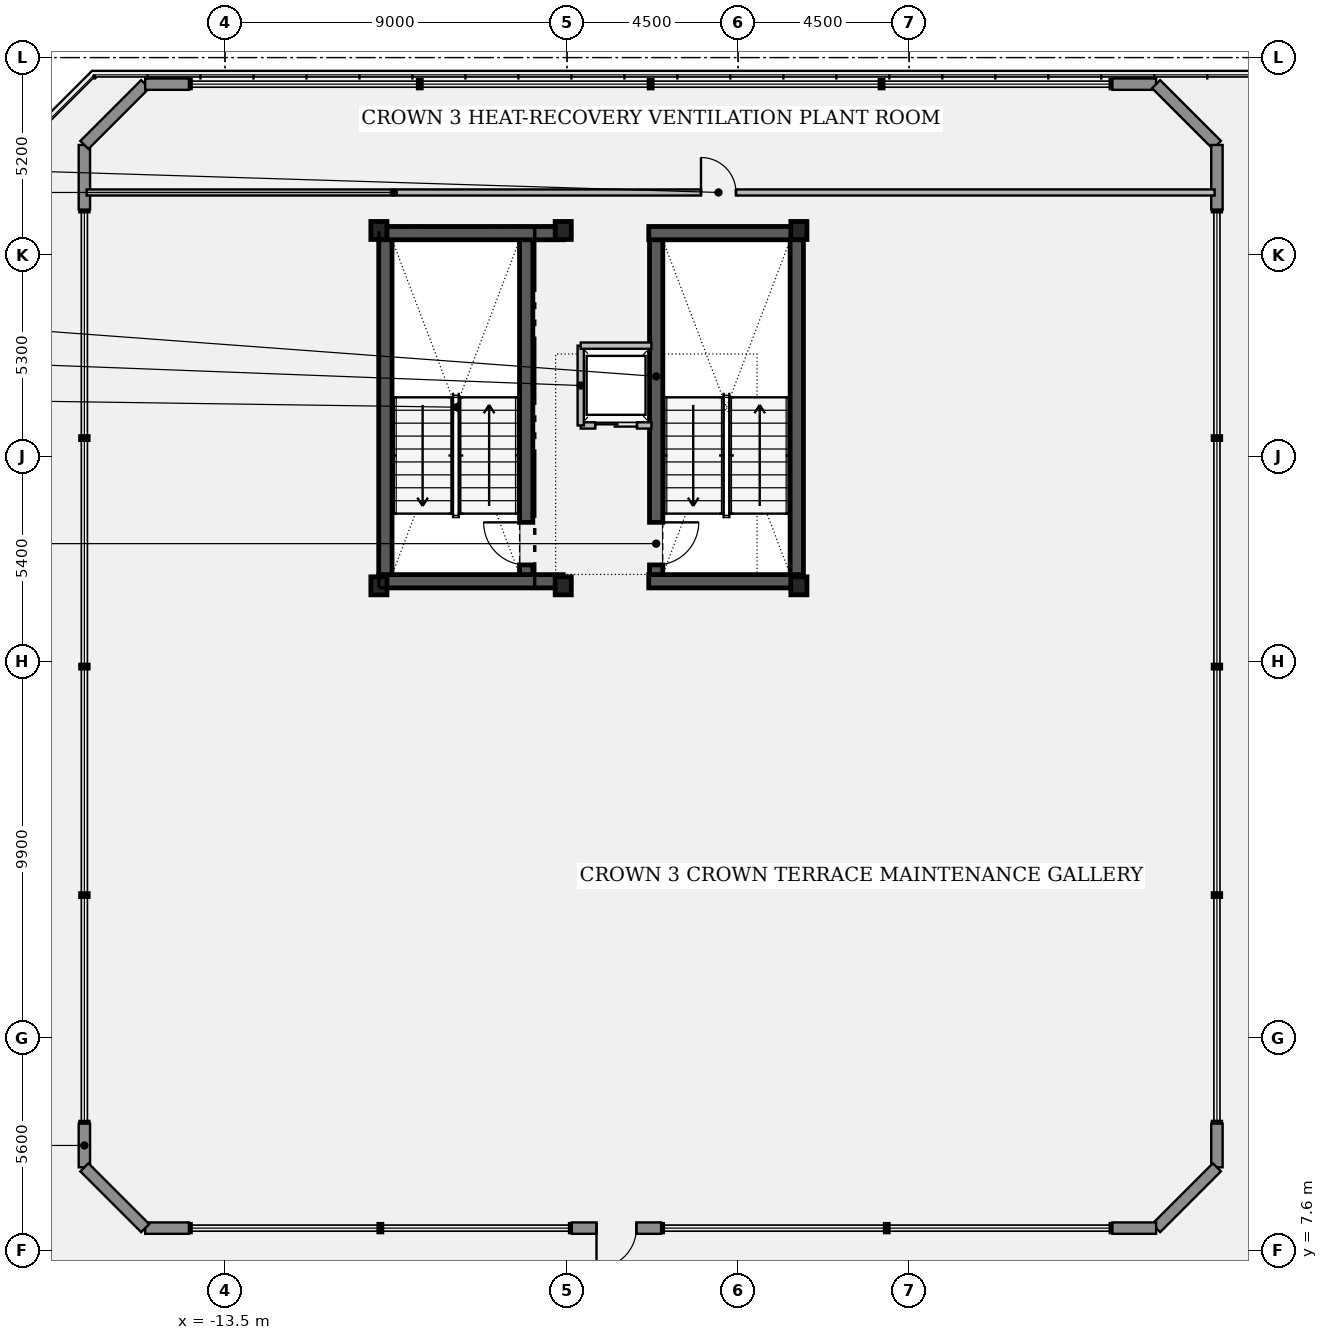
"""IFC4 building model, lengths in metres.
Left out: names, types, materials, properties, quantities, classifications, styles, units other than length and angle.
Written with IfcOpenShell. Run it as: python <this file> out.ifc"""

import sys

from ifc_helpers import new_model, si_unit, direction, frame, frame_2d, origin, origin_2d, place, context, subcontext, project, spatial, rectangle, i_section, extrude, element, fill, save


model = new_model("IFC4")
c1 = context("Model", 3, precision=1e-05, world=origin(), true_north=direction((0.0, 1.0)))
c2 = subcontext(c1, "Body", "Model", "MODEL_VIEW")
j1 = project(units=[si_unit("LENGTHUNIT", "METRE"), si_unit("PLANEANGLEUNIT", "RADIAN")], contexts=[c1])
p1 = place(None, origin())
s1 = spatial("IfcSite", under=j1, at=p1, CompositionType="ELEMENT")
p2 = place(p1, origin())
s2 = spatial("IfcBuilding", under=s1, at=p2, CompositionType="ELEMENT")
p3 = place(p2, frame((0.0, 0.0, 304.85)))
s3 = spatial("IfcBuildingStorey", under=s2, at=p3, CompositionType="ELEMENT", Elevation=304.85)
p4 = place(p3, frame((-5.575, 25.1, -0.19), z_axis=(0.0, 0.0, 1.0), x_axis=(0.0, 1.0, 0.0)))
e1 = element("IfcWall", 1, at=p4, inside=s3, PredefinedType="SHEAR", context=c2, shape_type="SweptSolid", body=[
    extrude(rectangle(XDim=9.35, YDim=0.35, at=frame_2d((4.675, 0.0))), origin(), (0.0, 0.0, 1.0), 3.8),
])
p5 = place(p4, frame((0.55, 0.0, 0.19)))
e2 = element("IfcOpeningElement", 2, at=p5, cuts=e1, PredefinedType="OPENING", context=c2, shape_type="SweptSolid", body=[
    extrude(rectangle(XDim=1.12, YDim=2.22, at=frame_2d((0.56, 1.11))), frame((0.0, 0.185, 0.0), z_axis=(0.0, -1.0, 0.0), x_axis=(1.0, 0.0, 0.0)), (0.0, 0.0, 1.0), 0.37),
])
p6 = place(p3, frame((-9.28, 34.45, -0.19), z_axis=(0.0, 0.0, 1.0), x_axis=(0.0, -1.0, 0.0)))
e3 = element("IfcWall", 3, at=p6, inside=s3, PredefinedType="SHEAR", context=c2, shape_type="SweptSolid", body=[
    extrude(rectangle(XDim=9.35, YDim=0.35, at=frame_2d((4.675, 0.0))), origin(), (0.0, 0.0, 1.0), 3.8),
])
for number, where, z_axis, x_axis in (
    (4, (-9.45, 25.22, -0.19), (0.0, 0.0, 1.0), (1.0, 0.0, 0.0)),
    (5, (-9.45, 34.38, -0.19), (0.0, 0.0, 1.0), (1.0, 0.0, 0.0)),
):
    element("IfcWall", number, at=place(p3, frame(where, z_axis=z_axis, x_axis=x_axis)), inside=s3, PredefinedType="SHEAR", context=c2, shape_type="SweptSolid", body=[
        extrude(rectangle(XDim=4.85, YDim=0.35, at=frame_2d((2.425, 0.0))), origin(), (0.0, 0.0, 1.0), 3.8),
    ])
p7 = place(p3, frame((-2.155, 34.45, -0.19), z_axis=(0.0, 0.0, 1.0), x_axis=(0.0, -1.0, 0.0)))
e6 = element("IfcWall", 6, at=p7, inside=s3, PredefinedType="SHEAR", context=c2, shape_type="SweptSolid", body=[
    extrude(rectangle(XDim=9.35, YDim=0.35, at=frame_2d((4.675, 0.0))), origin(), (0.0, 0.0, 1.0), 3.8),
])
p8 = place(p7, frame((7.68, 0.0, 0.19)))
e7 = element("IfcOpeningElement", 7, at=p8, cuts=e6, PredefinedType="OPENING", context=c2, shape_type="SweptSolid", body=[
    extrude(rectangle(XDim=1.12, YDim=2.22, at=frame_2d((0.56, 1.11))), frame((0.0, 0.185, 0.0), z_axis=(0.0, -1.0, 0.0), x_axis=(1.0, 0.0, 0.0)), (0.0, 0.0, 1.0), 0.37),
])
p9 = place(p3, frame((1.545, 25.1, -0.19), z_axis=(0.0, 0.0, 1.0), x_axis=(0.0, 1.0, 0.0)))
e8 = element("IfcWall", 8, at=p9, inside=s3, PredefinedType="SHEAR", context=c2, shape_type="SweptSolid", body=[
    extrude(rectangle(XDim=9.35, YDim=0.35, at=frame_2d((4.675, 0.0))), origin(), (0.0, 0.0, 1.0), 3.8),
])
for number, where, z_axis, x_axis in (
    (9, (-2.35, 25.22, -0.19), (0.0, 0.0, 1.0), (1.0, 0.0, 0.0)),
    (10, (-2.35, 34.38, -0.19), (0.0, 0.0, 1.0), (1.0, 0.0, 0.0)),
):
    element("IfcWall", number, at=place(p3, frame(where, z_axis=z_axis, x_axis=x_axis)), inside=s3, PredefinedType="SHEAR", context=c2, shape_type="SweptSolid", body=[
        extrude(rectangle(XDim=3.95, YDim=0.35, at=frame_2d((1.975, 0.0))), origin(), (0.0, 0.0, 1.0), 3.8),
    ])
for number, where, z_axis, x_axis in (
    (11, (-9.45, 25.1, 0.0), (0.0, 0.0, 1.0), (1.0, 0.0, 0.0)),
    (12, (-4.6, 25.1, 0.0), (0.0, 0.0, 1.0), (1.0, 0.0, 0.0)),
    (13, (1.6, 25.1, 0.0), (0.0, 0.0, 1.0), (1.0, 0.0, 0.0)),
    (14, (-9.45, 34.45, 0.0), (0.0, 0.0, 1.0), (1.0, 0.0, 0.0)),
    (15, (-4.6, 34.45, 0.0), (0.0, 0.0, 1.0), (1.0, 0.0, 0.0)),
    (16, (1.6, 34.45, 0.0), (0.0, 0.0, 1.0), (1.0, 0.0, 0.0)),
):
    element("IfcColumn", number, at=place(p3, frame(where, z_axis=z_axis, x_axis=x_axis)), inside=s3, PredefinedType="COLUMN", context=c2, shape_type="SweptSolid", body=[
        extrude(i_section(OverallWidth=0.424, OverallDepth=0.474, WebThickness=0.048, FlangeThickness=0.077, at=origin_2d()), origin(), (0.0, 0.0, 1.0), 3.8),
    ])
p10 = place(p3, frame((-17.2, 9.8, 0.0), z_axis=(0.0, 0.0, 1.0), x_axis=(0.0, 1.0, 0.0)))
e17 = element("IfcWall", 17, at=p10, inside=s3, PredefinedType="STANDARD", context=c2, shape_type="SweptSolid", body=[
    extrude(rectangle(XDim=1.15, YDim=0.3, at=frame_2d((0.575, 0.0))), origin(), (0.0, 0.0, 1.0), 3.56),
])
p11 = place(p3, frame((-17.2, 35.0, 0.0), z_axis=(0.0, 0.0, 1.0), x_axis=(0.0, 1.0, 0.0)))
e18 = element("IfcWall", 18, at=p11, inside=s3, PredefinedType="STANDARD", context=c2, shape_type="SweptSolid", body=[
    extrude(rectangle(XDim=1.7, YDim=0.3, at=frame_2d((0.85, 0.0))), origin(), (0.0, 0.0, 1.0), 3.56),
])
p12 = place(p3, frame((-17.2, 36.7, 0.0), z_axis=(0.0, 0.0, 1.0), x_axis=(0.707052830339, 0.707160727918, 0.0)))
e19 = element("IfcWall", 19, at=p12, inside=s3, PredefinedType="STANDARD", context=c2, shape_type="SweptSolid", body=[
    extrude(rectangle(XDim=2.263, YDim=0.3, at=frame_2d((1.131, 0.0))), origin(), (0.0, 0.0, 1.0), 3.56),
])
p13 = place(p3, frame((-15.6, 38.3, 0.0), z_axis=(0.0, 0.0, 1.0), x_axis=(1.0, 0.0, 0.0)))
e20 = element("IfcWall", 20, at=p13, inside=s3, PredefinedType="STANDARD", context=c2, shape_type="SweptSolid", body=[
    extrude(rectangle(XDim=1.15, YDim=0.3, at=frame_2d((0.575, 0.0))), origin(), (0.0, 0.0, 1.0), 3.56),
])
p14 = place(p3, frame((9.85, 38.3, 0.0), z_axis=(0.0, 0.0, 1.0), x_axis=(1.0, 0.0, 0.0)))
e21 = element("IfcWall", 21, at=p14, inside=s3, PredefinedType="STANDARD", context=c2, shape_type="SweptSolid", body=[
    extrude(rectangle(XDim=1.15, YDim=0.3, at=frame_2d((0.575, 0.0))), origin(), (0.0, 0.0, 1.0), 3.56),
])
p15 = place(p3, frame((11.0, 38.3, 0.0), z_axis=(0.0, 0.0, 1.0), x_axis=(0.707106781187, -0.707106781187, 0.0)))
e22 = element("IfcWall", 22, at=p15, inside=s3, PredefinedType="STANDARD", context=c2, shape_type="SweptSolid", body=[
    extrude(rectangle(XDim=2.263, YDim=0.3, at=frame_2d((1.131, 0.0))), origin(), (0.0, 0.0, 1.0), 3.56),
])
p16 = place(p3, frame((12.6, 36.7, 0.0), z_axis=(0.0, 0.0, 1.0), x_axis=(0.0, -1.0, 0.0)))
e23 = element("IfcWall", 23, at=p16, inside=s3, PredefinedType="STANDARD", context=c2, shape_type="SweptSolid", body=[
    extrude(rectangle(XDim=1.7, YDim=0.3, at=frame_2d((0.85, 0.0))), origin(), (0.0, 0.0, 1.0), 3.56),
])
p17 = place(p3, frame((12.6, 10.95, 0.0), z_axis=(0.0, 0.0, 1.0), x_axis=(0.0, -1.0, 0.0)))
e24 = element("IfcWall", 24, at=p17, inside=s3, PredefinedType="STANDARD", context=c2, shape_type="SweptSolid", body=[
    extrude(rectangle(XDim=1.15, YDim=0.3, at=frame_2d((0.575, 0.0))), origin(), (0.0, 0.0, 1.0), 3.56),
])
p18 = place(p3, frame((12.6, 9.8, 0.0), z_axis=(0.0, 0.0, 1.0), x_axis=(-0.707106781187, -0.707106781187, 0.0)))
e25 = element("IfcWall", 25, at=p18, inside=s3, PredefinedType="STANDARD", context=c2, shape_type="SweptSolid", body=[
    extrude(rectangle(XDim=2.263, YDim=0.3, at=frame_2d((1.131, 0.0))), origin(), (0.0, 0.0, 1.0), 3.56),
])
p19 = place(p3, frame((11.0, 8.2, 0.0), z_axis=(0.0, 0.0, 1.0), x_axis=(-1.0, 0.0, 0.0)))
e26 = element("IfcWall", 26, at=p19, inside=s3, PredefinedType="STANDARD", context=c2, shape_type="SweptSolid", body=[
    extrude(rectangle(XDim=1.15, YDim=0.3, at=frame_2d((0.575, 0.0))), origin(), (0.0, 0.0, 1.0), 3.56),
])
p20 = place(p3, frame((-2.025, 8.2, 0.0), z_axis=(0.0, 0.0, 1.0), x_axis=(-1.0, 0.0, 0.0)))
e27 = element("IfcWall", 27, at=p20, inside=s3, PredefinedType="STANDARD", context=c2, shape_type="SweptSolid", body=[
    extrude(rectangle(XDim=2.35, YDim=0.3, at=frame_2d((1.175, 0.0))), origin(), (0.0, 0.0, 1.0), 3.56),
])
p21 = place(p20, frame((0.65, 0.0, 0.0)))
e28 = element("IfcOpeningElement", 28, at=p21, cuts=e27, PredefinedType="OPENING", context=c2, shape_type="SweptSolid", body=[
    extrude(rectangle(XDim=1.05, YDim=2.2, at=frame_2d((0.525, 1.1))), frame((0.0, 0.16, 0.0), z_axis=(0.0, -1.0, 0.0), x_axis=(1.0, 0.0, 0.0)), (0.0, 0.0, 1.0), 0.32),
])
p22 = place(p3, frame((-14.45, 8.2, 0.0), z_axis=(0.0, 0.0, 1.0), x_axis=(-1.0, 0.0, 0.0)))
e29 = element("IfcWall", 29, at=p22, inside=s3, PredefinedType="STANDARD", context=c2, shape_type="SweptSolid", body=[
    extrude(rectangle(XDim=1.15, YDim=0.3, at=frame_2d((0.575, 0.0))), origin(), (0.0, 0.0, 1.0), 3.56),
])
p23 = place(p3, frame((-15.6, 8.2, 0.0), z_axis=(0.0, 0.0, 1.0), x_axis=(-0.707052830339, 0.707160727918, 0.0)))
e30 = element("IfcWall", 30, at=p23, inside=s3, PredefinedType="STANDARD", context=c2, shape_type="SweptSolid", body=[
    extrude(rectangle(XDim=2.263, YDim=0.3, at=frame_2d((1.131, 0.0))), origin(), (0.0, 0.0, 1.0), 3.56),
])
p24 = place(p3, frame((-4.14, 29.32, 0.0), z_axis=(0.0, 0.0, 1.0), x_axis=(1.0, 0.0, 0.0)))
e31 = element("IfcWall", 31, at=p24, inside=s3, PredefinedType="PARTITIONING", context=c2, shape_type="SweptSolid", body=[
    extrude(rectangle(XDim=1.86, YDim=0.165, at=frame_2d((0.93, 0.0))), origin(), (0.0, 0.0, 1.0), 3.56),
])
p25 = place(p24, frame((0.38, 0.0, 0.0)))
e32 = element("IfcOpeningElement", 32, at=p25, cuts=e31, PredefinedType="OPENING", context=c2, shape_type="SweptSolid", body=[
    extrude(rectangle(XDim=1.1, YDim=2.25, at=frame_2d((0.55, 1.125))), frame((0.0, 0.093, 0.0), z_axis=(0.0, -1.0, 0.0), x_axis=(1.0, 0.0, 0.0)), (0.0, 0.0, 1.0), 0.185),
])
p26 = place(p3, frame((-17.14, 35.45, 0.0), z_axis=(0.0, 0.0, 1.0), x_axis=(1.0, 0.0, 0.0)))
e33 = element("IfcWall", 33, at=p26, inside=s3, PredefinedType="PARTITIONING", context=c2, shape_type="SweptSolid", body=[
    extrude(rectangle(XDim=29.68, YDim=0.16, at=frame_2d((14.84, 0.0))), origin(), (0.0, 0.0, 1.0), 3.56),
])
p27 = place(p26, frame((16.165, 0.0, 0.0)))
e34 = element("IfcOpeningElement", 34, at=p27, cuts=e33, PredefinedType="OPENING", context=c2, shape_type="SweptSolid", body=[
    extrude(rectangle(XDim=0.92, YDim=2.12, at=frame_2d((0.46, 1.06))), frame((0.0, 0.09, 0.0), z_axis=(0.0, -1.0, 0.0), x_axis=(1.0, 0.0, 0.0)), (0.0, 0.0, 1.0), 0.18),
])
p28 = place(p3, frame((-4.14, 29.32, 0.0), z_axis=(0.0, 0.0, 1.0), x_axis=(0.0, 1.0, 0.0)))
e35 = element("IfcWall", 35, at=p28, inside=s3, PredefinedType="PARTITIONING", context=c2, shape_type="SweptSolid", body=[
    extrude(rectangle(XDim=2.1, YDim=0.165, at=frame_2d((1.05, 0.0))), origin(), (0.0, 0.0, 1.0), 2.442),
])
p29 = place(p3, frame((-4.14, 31.42, 0.0), z_axis=(0.0, 0.0, 1.0), x_axis=(1.0, 0.0, 0.0)))
e36 = element("IfcWall", 36, at=p29, inside=s3, PredefinedType="PARTITIONING", context=c2, shape_type="SweptSolid", body=[
    extrude(rectangle(XDim=1.86, YDim=0.165, at=frame_2d((0.93, 0.0))), origin(), (0.0, 0.0, 1.0), 3.56),
])
p30 = place(p21, origin())
e37 = element("IfcDoor", 37, at=p30, inside=s3, OperationType="SINGLE_SWING_RIGHT", PredefinedType="DOOR", context=c2, shape_type="SweptSolid", body=[
    extrude(rectangle(XDim=1.05, YDim=2.2, at=frame_2d((0.525, 1.1))), frame((0.0, 0.025, 0.0), z_axis=(0.0, -1.0, 0.0), x_axis=(1.0, 0.0, 0.0)), (0.0, 0.0, 1.0), 0.05),
])
fill(e28, e37)
p31 = place(p5, origin())
e38 = element("IfcDoor", 38, at=p31, inside=s3, OperationType="SINGLE_SWING_RIGHT", PredefinedType="DOOR", context=c2, shape_type="SweptSolid", body=[
    extrude(rectangle(XDim=1.12, YDim=2.22, at=frame_2d((0.56, 1.11))), frame((0.0, 0.025, 0.0), z_axis=(0.0, -1.0, 0.0), x_axis=(1.0, 0.0, 0.0)), (0.0, 0.0, 1.0), 0.05),
])
fill(e2, e38)
p32 = place(p8, origin())
e39 = element("IfcDoor", 39, at=p32, inside=s3, OperationType="SINGLE_SWING_LEFT", PredefinedType="DOOR", context=c2, shape_type="SweptSolid", body=[
    extrude(rectangle(XDim=1.12, YDim=2.22, at=frame_2d((0.56, 1.11))), frame((0.0, 0.025, 0.0), z_axis=(0.0, -1.0, 0.0), x_axis=(1.0, 0.0, 0.0)), (0.0, 0.0, 1.0), 0.05),
])
fill(e7, e39)
p33 = place(p25, origin())
e40 = element("IfcDoor", 40, at=p33, inside=s3, OperationType="SLIDING_TO_LEFT", PredefinedType="DOOR", context=c2, shape_type="SweptSolid", body=[
    extrude(rectangle(XDim=1.1, YDim=2.25, at=frame_2d((0.55, 1.125))), frame((0.0, 0.025, 0.0), z_axis=(0.0, -1.0, 0.0), x_axis=(1.0, 0.0, 0.0)), (0.0, 0.0, 1.0), 0.05),
])
fill(e32, e40)
p34 = place(p27, origin())
e41 = element("IfcDoor", 41, at=p34, inside=s3, OperationType="SINGLE_SWING_LEFT", PredefinedType="DOOR", context=c2, shape_type="SweptSolid", body=[
    extrude(rectangle(XDim=0.92, YDim=2.12, at=frame_2d((0.46, 1.06))), frame((0.0, 0.025, 0.0), z_axis=(0.0, -1.0, 0.0), x_axis=(1.0, 0.0, 0.0)), (0.0, 0.0, 1.0), 0.05),
])
fill(e34, e41)
save(model, sys.argv[1])
